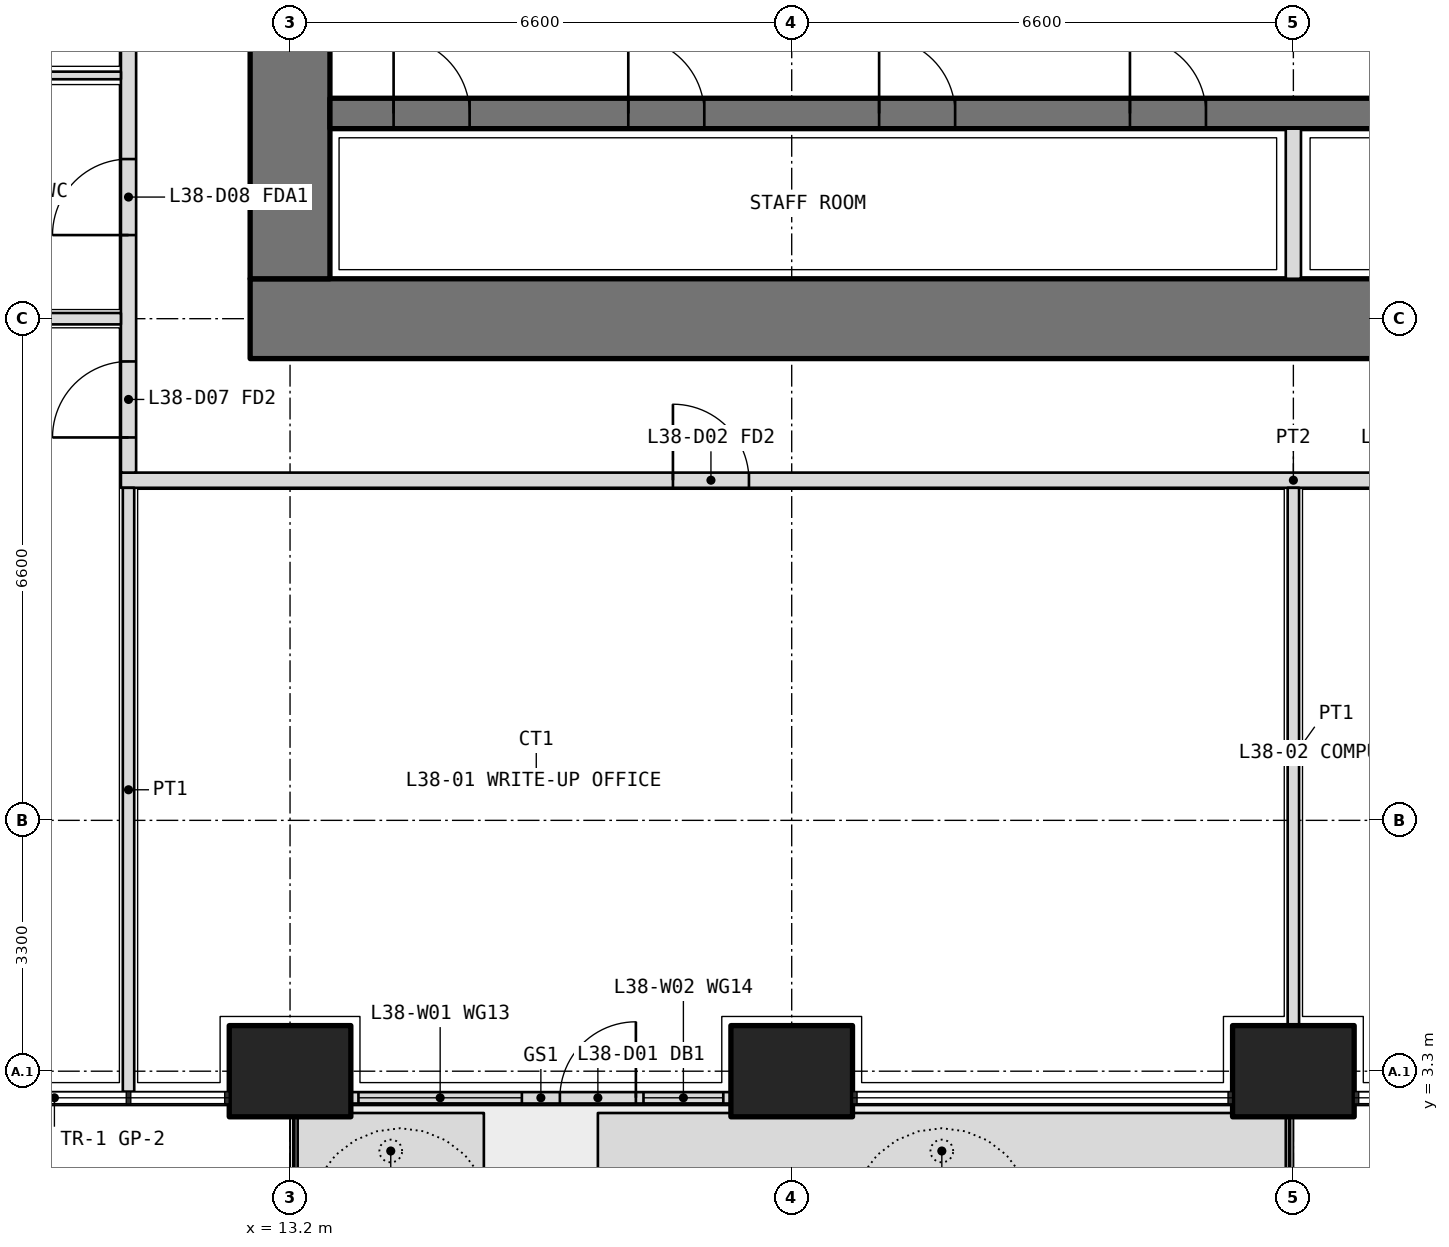
"""IFC4 building model, lengths in metres.
Left out: names, types, materials, properties, quantities, classifications, styles, units other than length and angle.
Written with IfcOpenShell. Run it as: python <this file> out.ifc"""

import sys

from ifc_helpers import new_model, si_unit, direction, frame, frame_2d, origin, origin_2d, place, context, subcontext, project, spatial, polyline, rectangle, outline, extrude, element, fill, save


model = new_model("IFC4")
c1 = context("Model", 3, precision=1e-05, world=origin(), true_north=direction((0.0, 1.0)))
c2 = subcontext(c1, "Body", "Model", "MODEL_VIEW")
j1 = project(units=[si_unit("LENGTHUNIT", "METRE"), si_unit("PLANEANGLEUNIT", "RADIAN")], contexts=[c1])
p1 = place(None, origin())
s1 = spatial("IfcSite", under=j1, at=p1, CompositionType="ELEMENT")
p2 = place(p1, origin())
s2 = spatial("IfcBuilding", under=s1, at=p2, CompositionType="ELEMENT")
p3 = place(p2, frame((0.0, 0.0, 168.3)))
s3 = spatial("IfcBuildingStorey", under=s2, at=p3, CompositionType="ELEMENT", Elevation=168.3)
for number, where, z_axis, x_axis in (
    (1, (13.2, 3.3, 0.0), (0.0, 0.0, 1.0), (1.0, 0.0, 0.0)),
    (2, (19.8, 3.3, 0.0), (0.0, 0.0, 1.0), (1.0, 0.0, 0.0)),
    (3, (26.4, 3.3, 0.0), (0.0, 0.0, 1.0), (1.0, 0.0, 0.0)),
):
    element("IfcColumn", number, at=place(p3, frame(where, z_axis=z_axis, x_axis=x_axis)), inside=s3, PredefinedType="COLUMN", context=c2, shape_type="SweptSolid", body=[
        extrude(rectangle(XDim=1.6, YDim=1.2, at=origin_2d()), origin(), (0.0, 0.0, 1.0), 4.2),
    ])
p4 = place(p3, origin())
e4 = element("IfcWall", 4, at=p4, inside=s3, PredefinedType="USERDEFINED", context=c2, shape_type="SweptSolid", body=[
    extrude(outline(polyline([(13.3, 1.75), (15.75, 1.75), (15.75, 2.75), (13.3, 2.75), (13.3, 1.75)]), holes=[polyline([(13.45, 1.9), (15.6, 1.9), (15.6, 2.6), (13.45, 2.6), (13.45, 1.9)])]), origin(), (0.0, 0.0, 1.0), 1.05),
])
p5 = place(p3, origin())
e5 = element("IfcWall", 5, at=p5, inside=s3, PredefinedType="USERDEFINED", context=c2, shape_type="SweptSolid", body=[
    extrude(outline(polyline([(17.25, 1.75), (26.3, 1.75), (26.3, 2.75), (17.25, 2.75), (17.25, 1.75)]), holes=[polyline([(17.4, 1.9), (26.15, 1.9), (26.15, 2.6), (17.4, 2.6), (17.4, 1.9)])]), origin(), (0.0, 0.0, 1.0), 1.05),
])
p6 = place(p3, frame((14.0, 2.95, 0.0), z_axis=(0.0, 0.0, 1.0), x_axis=(1.0, 0.0, 0.0)))
e6 = element("IfcWall", 6, at=p6, inside=s3, PredefinedType="SOLIDWALL", context=c2, shape_type="SweptSolid", body=[
    extrude(rectangle(XDim=5.0, YDim=0.15, at=frame_2d((2.5, 0.0))), origin(), (0.0, 0.0, 1.0), 2.7),
])
p7 = place(p6, frame((2.75, 0.0, 0.0)))
e7 = element("IfcOpeningElement", 7, at=p7, cuts=e6, PredefinedType="OPENING", context=c2, shape_type="SweptSolid", body=[
    extrude(rectangle(XDim=1.0, YDim=2.4, at=frame_2d((0.5, 1.2))), frame((0.0, 0.085, 0.0), z_axis=(0.0, -1.0, 0.0), x_axis=(1.0, 0.0, 0.0)), (0.0, 0.0, 1.0), 0.17),
])
p8 = place(p6, frame((0.1, 0.0, 0.1)))
e8 = element("IfcOpeningElement", 8, at=p8, cuts=e6, PredefinedType="OPENING", context=c2, shape_type="SweptSolid", body=[
    extrude(rectangle(XDim=2.15, YDim=2.3, at=frame_2d((1.075, 1.15))), frame((0.0, 0.085, 0.0), z_axis=(0.0, -1.0, 0.0), x_axis=(1.0, 0.0, 0.0)), (0.0, 0.0, 1.0), 0.17),
])
p9 = place(p6, frame((3.85, 0.0, 0.1)))
e9 = element("IfcOpeningElement", 9, at=p9, cuts=e6, PredefinedType="OPENING", context=c2, shape_type="SweptSolid", body=[
    extrude(rectangle(XDim=1.05, YDim=2.3, at=frame_2d((0.525, 1.15))), frame((0.0, 0.085, 0.0), z_axis=(0.0, -1.0, 0.0), x_axis=(1.0, 0.0, 0.0)), (0.0, 0.0, 1.0), 0.17),
])
p10 = place(p3, frame((12.675, 13.2, 0.0), z_axis=(0.0, 0.0, 1.0), x_axis=(1.0, 0.0, 0.0)))
e10 = element("IfcWall", 10, at=p10, inside=s3, PredefinedType="SHEAR", context=c2, shape_type="SweptSolid", body=[
    extrude(rectangle(XDim=27.45, YDim=1.05, at=frame_2d((13.725, 0.0))), origin(), (0.0, 0.0, 1.0), 4.2),
])
p11 = place(p3, frame((13.2, 32.475, 0.0), z_axis=(0.0, 0.0, 1.0), x_axis=(0.0, -1.0, 0.0)))
e11 = element("IfcWall", 11, at=p11, inside=s3, PredefinedType="SHEAR", context=c2, shape_type="SweptSolid", body=[
    extrude(rectangle(XDim=18.75, YDim=1.05, at=frame_2d((9.375, 0.0))), origin(), (0.0, 0.0, 1.0), 4.2),
])
p12 = place(p11, frame((14.125, 0.0, 0.0)))
e12 = element("IfcOpeningElement", 12, at=p12, cuts=e11, PredefinedType="OPENING", context=c2, shape_type="SweptSolid", body=[
    extrude(rectangle(XDim=1.6, YDim=2.1, at=frame_2d((0.8, 1.05))), frame((0.0, 0.535, 0.0), z_axis=(0.0, -1.0, 0.0), x_axis=(1.0, 0.0, 0.0)), (0.0, 0.0, 1.0), 1.07),
])
p13 = place(p11, frame((3.325, 0.0, 0.0)))
e13 = element("IfcOpeningElement", 13, at=p13, cuts=e11, PredefinedType="OPENING", context=c2, shape_type="SweptSolid", body=[
    extrude(rectangle(XDim=1.6, YDim=2.1, at=frame_2d((0.8, 1.05))), frame((0.0, 0.535, 0.0), z_axis=(0.0, -1.0, 0.0), x_axis=(1.0, 0.0, 0.0)), (0.0, 0.0, 1.0), 1.07),
])
p14 = place(p3, frame((13.725, 15.9, 0.0), z_axis=(0.0, 0.0, 1.0), x_axis=(1.0, 0.0, 0.0)))
e14 = element("IfcWall", 14, at=p14, inside=s3, PredefinedType="SHEAR", context=c2, shape_type="SweptSolid", body=[
    extrude(rectangle(XDim=25.35, YDim=0.4, at=frame_2d((12.675, 0.0))), origin(), (0.0, 0.0, 1.0), 4.2),
])
p15 = place(p14, frame((0.837, 0.0, 0.0)))
e15 = element("IfcOpeningElement", 15, at=p15, cuts=e14, PredefinedType="OPENING", context=c2, shape_type="SweptSolid", body=[
    extrude(rectangle(XDim=1.0, YDim=2.1, at=frame_2d((0.5, 1.05))), frame((0.0, 0.21, 0.0), z_axis=(0.0, -1.0, 0.0), x_axis=(1.0, 0.0, 0.0)), (0.0, 0.0, 1.0), 0.42),
])
p16 = place(p14, frame((3.925, 0.0, 0.0)))
e16 = element("IfcOpeningElement", 16, at=p16, cuts=e14, PredefinedType="OPENING", context=c2, shape_type="SweptSolid", body=[
    extrude(rectangle(XDim=1.0, YDim=2.1, at=frame_2d((0.5, 1.05))), frame((0.0, 0.21, 0.0), z_axis=(0.0, -1.0, 0.0), x_axis=(1.0, 0.0, 0.0)), (0.0, 0.0, 1.0), 0.42),
])
p17 = place(p14, frame((7.225, 0.0, 0.0)))
e17 = element("IfcOpeningElement", 17, at=p17, cuts=e14, PredefinedType="OPENING", context=c2, shape_type="SweptSolid", body=[
    extrude(rectangle(XDim=1.0, YDim=2.1, at=frame_2d((0.5, 1.05))), frame((0.0, 0.21, 0.0), z_axis=(0.0, -1.0, 0.0), x_axis=(1.0, 0.0, 0.0)), (0.0, 0.0, 1.0), 0.42),
])
p18 = place(p14, frame((10.525, 0.0, 0.0)))
e18 = element("IfcOpeningElement", 18, at=p18, cuts=e14, PredefinedType="OPENING", context=c2, shape_type="SweptSolid", body=[
    extrude(rectangle(XDim=1.0, YDim=2.1, at=frame_2d((0.5, 1.05))), frame((0.0, 0.21, 0.0), z_axis=(0.0, -1.0, 0.0), x_axis=(1.0, 0.0, 0.0)), (0.0, 0.0, 1.0), 0.42),
])
p19 = place(p14, frame((13.825, 0.0, 0.0)))
e19 = element("IfcOpeningElement", 19, at=p19, cuts=e14, PredefinedType="OPENING", context=c2, shape_type="SweptSolid", body=[
    extrude(rectangle(XDim=1.0, YDim=2.1, at=frame_2d((0.5, 1.05))), frame((0.0, 0.21, 0.0), z_axis=(0.0, -1.0, 0.0), x_axis=(1.0, 0.0, 0.0)), (0.0, 0.0, 1.0), 0.42),
])
p20 = place(p14, frame((17.125, 0.0, 0.0)))
e20 = element("IfcOpeningElement", 20, at=p20, cuts=e14, PredefinedType="OPENING", context=c2, shape_type="SweptSolid", body=[
    extrude(rectangle(XDim=1.0, YDim=2.1, at=frame_2d((0.5, 1.05))), frame((0.0, 0.21, 0.0), z_axis=(0.0, -1.0, 0.0), x_axis=(1.0, 0.0, 0.0)), (0.0, 0.0, 1.0), 0.42),
])
p21 = place(p14, frame((20.425, 0.0, 0.0)))
e21 = element("IfcOpeningElement", 21, at=p21, cuts=e14, PredefinedType="OPENING", context=c2, shape_type="SweptSolid", body=[
    extrude(rectangle(XDim=1.0, YDim=2.1, at=frame_2d((0.5, 1.05))), frame((0.0, 0.21, 0.0), z_axis=(0.0, -1.0, 0.0), x_axis=(1.0, 0.0, 0.0)), (0.0, 0.0, 1.0), 0.42),
])
p22 = place(p14, frame((23.512, 0.0, 0.0)))
e22 = element("IfcOpeningElement", 22, at=p22, cuts=e14, PredefinedType="OPENING", context=c2, shape_type="SweptSolid", body=[
    extrude(rectangle(XDim=1.0, YDim=2.1, at=frame_2d((0.5, 1.05))), frame((0.0, 0.21, 0.0), z_axis=(0.0, -1.0, 0.0), x_axis=(1.0, 0.0, 0.0)), (0.0, 0.0, 1.0), 0.42),
])
p23 = place(p3, frame((26.4, 13.725, 0.0), z_axis=(0.0, 0.0, 1.0), x_axis=(0.0, 1.0, 0.0)))
e23 = element("IfcWall", 23, at=p23, inside=s3, PredefinedType="PARTITIONING", context=c2, shape_type="SweptSolid", body=[
    extrude(rectangle(XDim=1.975, YDim=0.2, at=frame_2d((0.987, 0.0))), origin(), (0.0, 0.0, 1.0), 4.2),
])
p24 = place(p3, frame((10.975, 11.075, 0.0), z_axis=(0.0, 0.0, 1.0), x_axis=(1.0, 0.0, 0.0)))
e24 = element("IfcWall", 24, at=p24, inside=s3, PredefinedType="PARTITIONING", context=c2, shape_type="SweptSolid", body=[
    extrude(rectangle(XDim=30.85, YDim=0.2, at=frame_2d((15.425, 0.0))), origin(), (0.0, 0.0, 1.0), 2.85),
])
p25 = place(p24, frame((7.262, 0.0, 0.0)))
e25 = element("IfcOpeningElement", 25, at=p25, cuts=e24, PredefinedType="OPENING", context=c2, shape_type="SweptSolid", body=[
    extrude(rectangle(XDim=1.0, YDim=2.1, at=frame_2d((0.5, 1.05))), frame((0.0, 0.11, 0.0), z_axis=(0.0, -1.0, 0.0), x_axis=(1.0, 0.0, 0.0)), (0.0, 0.0, 1.0), 0.22),
])
p26 = place(p24, frame((16.475, 0.0, 0.0)))
e26 = element("IfcOpeningElement", 26, at=p26, cuts=e24, PredefinedType="OPENING", context=c2, shape_type="SweptSolid", body=[
    extrude(rectangle(XDim=1.2, YDim=2.1, at=frame_2d((0.6, 1.05))), frame((0.0, 0.11, 0.0), z_axis=(0.0, -1.0, 0.0), x_axis=(1.0, 0.0, 0.0)), (0.0, 0.0, 1.0), 0.22),
])
p27 = place(p24, frame((21.525, 0.0, 0.0)))
e27 = element("IfcOpeningElement", 27, at=p27, cuts=e24, PredefinedType="OPENING", context=c2, shape_type="SweptSolid", body=[
    extrude(rectangle(XDim=1.0, YDim=2.1, at=frame_2d((0.5, 1.05))), frame((0.0, 0.11, 0.0), z_axis=(0.0, -1.0, 0.0), x_axis=(1.0, 0.0, 0.0)), (0.0, 0.0, 1.0), 0.22),
])
p28 = place(p24, frame((26.375, 0.0, 0.0)))
e28 = element("IfcOpeningElement", 28, at=p28, cuts=e24, PredefinedType="OPENING", context=c2, shape_type="SweptSolid", body=[
    extrude(rectangle(XDim=1.2, YDim=2.1, at=frame_2d((0.6, 1.05))), frame((0.0, 0.11, 0.0), z_axis=(0.0, -1.0, 0.0), x_axis=(1.0, 0.0, 0.0)), (0.0, 0.0, 1.0), 0.22),
])
p29 = place(p24, frame((29.188, 0.0, 0.0)))
e29 = element("IfcOpeningElement", 29, at=p29, cuts=e24, PredefinedType="OPENING", context=c2, shape_type="SweptSolid", body=[
    extrude(rectangle(XDim=1.0, YDim=2.1, at=frame_2d((0.5, 1.05))), frame((0.0, 0.11, 0.0), z_axis=(0.0, -1.0, 0.0), x_axis=(1.0, 0.0, 0.0)), (0.0, 0.0, 1.0), 0.22),
])
p30 = place(p3, frame((11.075, 11.175, 0.0), z_axis=(0.0, 0.0, 1.0), x_axis=(0.0, 1.0, 0.0)))
e30 = element("IfcWall", 30, at=p30, inside=s3, PredefinedType="PARTITIONING", context=c2, shape_type="SweptSolid", body=[
    extrude(rectangle(XDim=15.225, YDim=0.2, at=frame_2d((7.612, 0.0))), origin(), (0.0, 0.0, 1.0), 2.85),
])
p31 = place(p30, frame((0.462, 0.0, 0.0)))
e31 = element("IfcOpeningElement", 31, at=p31, cuts=e30, PredefinedType="OPENING", context=c2, shape_type="SweptSolid", body=[
    extrude(rectangle(XDim=1.0, YDim=2.1, at=frame_2d((0.5, 1.05))), frame((0.0, 0.11, 0.0), z_axis=(0.0, -1.0, 0.0), x_axis=(1.0, 0.0, 0.0)), (0.0, 0.0, 1.0), 0.22),
])
p32 = place(p30, frame((3.125, 0.0, 0.0)))
e32 = element("IfcOpeningElement", 32, at=p32, cuts=e30, PredefinedType="OPENING", context=c2, shape_type="SweptSolid", body=[
    extrude(rectangle(XDim=1.0, YDim=2.1, at=frame_2d((0.5, 1.05))), frame((0.0, 0.11, 0.0), z_axis=(0.0, -1.0, 0.0), x_axis=(1.0, 0.0, 0.0)), (0.0, 0.0, 1.0), 0.22),
])
p33 = place(p30, frame((6.475, 0.0, 0.0)))
e33 = element("IfcOpeningElement", 33, at=p33, cuts=e30, PredefinedType="OPENING", context=c2, shape_type="SweptSolid", body=[
    extrude(rectangle(XDim=0.9, YDim=2.1, at=frame_2d((0.45, 1.05))), frame((0.0, 0.11, 0.0), z_axis=(0.0, -1.0, 0.0), x_axis=(1.0, 0.0, 0.0)), (0.0, 0.0, 1.0), 0.22),
])
p34 = place(p30, frame((9.675, 0.0, 0.0)))
e34 = element("IfcOpeningElement", 34, at=p34, cuts=e30, PredefinedType="OPENING", context=c2, shape_type="SweptSolid", body=[
    extrude(rectangle(XDim=0.9, YDim=2.1, at=frame_2d((0.45, 1.05))), frame((0.0, 0.11, 0.0), z_axis=(0.0, -1.0, 0.0), x_axis=(1.0, 0.0, 0.0)), (0.0, 0.0, 1.0), 0.22),
])
p35 = place(p30, frame((12.925, 0.0, 0.0)))
e35 = element("IfcOpeningElement", 35, at=p35, cuts=e30, PredefinedType="OPENING", context=c2, shape_type="SweptSolid", body=[
    extrude(rectangle(XDim=1.0, YDim=2.1, at=frame_2d((0.5, 1.05))), frame((0.0, 0.11, 0.0), z_axis=(0.0, -1.0, 0.0), x_axis=(1.0, 0.0, 0.0)), (0.0, 0.0, 1.0), 0.22),
])
p36 = place(p3, frame((11.075, 3.03, 0.0), z_axis=(0.0, 0.0, 1.0), x_axis=(0.0, 1.0, 0.0)))
e36 = element("IfcWall", 36, at=p36, inside=s3, PredefinedType="PARTITIONING", context=c2, shape_type="SweptSolid", body=[
    extrude(rectangle(XDim=7.945, YDim=0.15, at=frame_2d((3.973, 0.0))), origin(), (0.0, 0.0, 1.0), 2.7),
])
p37 = place(p3, frame((26.4, 3.9, 0.0), z_axis=(0.0, 0.0, 1.0), x_axis=(0.0, 1.0, 0.0)))
e37 = element("IfcWall", 37, at=p37, inside=s3, PredefinedType="PARTITIONING", context=c2, shape_type="SweptSolid", body=[
    extrude(rectangle(XDim=7.075, YDim=0.15, at=frame_2d((3.538, 0.0))), origin(), (0.0, 0.0, 1.0), 2.85),
])
p38 = place(p3, frame((3.03, 16.4, 0.0), z_axis=(0.0, 0.0, 1.0), x_axis=(1.0, 0.0, 0.0)))
e38 = element("IfcWall", 38, at=p38, inside=s3, PredefinedType="PARTITIONING", context=c2, shape_type="SweptSolid", body=[
    extrude(rectangle(XDim=7.945, YDim=0.1, at=frame_2d((3.973, 0.0))), origin(), (0.0, 0.0, 1.0), 2.7),
])
p39 = place(p3, frame((7.2, 13.2, 0.0), z_axis=(0.0, 0.0, 1.0), x_axis=(1.0, 0.0, 0.0)))
e39 = element("IfcWall", 39, at=p39, inside=s3, PredefinedType="PARTITIONING", context=c2, shape_type="SweptSolid", body=[
    extrude(rectangle(XDim=3.775, YDim=0.15, at=frame_2d((1.888, 0.0))), origin(), (0.0, 0.0, 1.0), 2.85),
])
p40 = place(p7, origin())
e40 = element("IfcDoor", 40, at=p40, inside=s3, OperationType="SINGLE_SWING_RIGHT", PredefinedType="DOOR", context=c2, shape_type="SweptSolid", body=[
    extrude(rectangle(XDim=1.0, YDim=2.4, at=frame_2d((0.5, 1.2))), frame((0.0, 0.025, 0.0), z_axis=(0.0, -1.0, 0.0), x_axis=(1.0, 0.0, 0.0)), (0.0, 0.0, 1.0), 0.05),
])
fill(e7, e40)
p41 = place(p8, origin())
e41 = element("IfcWindow", 41, at=p41, inside=s3, PartitioningType="SINGLE_PANEL", PredefinedType="WINDOW", context=c2, shape_type="SweptSolid", body=[
    extrude(rectangle(XDim=2.15, YDim=2.3, at=frame_2d((1.075, 1.15))), frame((0.0, 0.03, 0.0), z_axis=(0.0, -1.0, 0.0), x_axis=(1.0, 0.0, 0.0)), (0.0, 0.0, 1.0), 0.06),
])
fill(e8, e41)
p42 = place(p9, origin())
e42 = element("IfcWindow", 42, at=p42, inside=s3, PartitioningType="SINGLE_PANEL", PredefinedType="WINDOW", context=c2, shape_type="SweptSolid", body=[
    extrude(rectangle(XDim=1.05, YDim=2.3, at=frame_2d((0.525, 1.15))), frame((0.0, 0.03, 0.0), z_axis=(0.0, -1.0, 0.0), x_axis=(1.0, 0.0, 0.0)), (0.0, 0.0, 1.0), 0.06),
])
fill(e9, e42)
p43 = place(p25, origin())
e43 = element("IfcDoor", 43, at=p43, inside=s3, OperationType="SINGLE_SWING_LEFT", PredefinedType="DOOR", context=c2, shape_type="SweptSolid", body=[
    extrude(rectangle(XDim=1.0, YDim=2.1, at=frame_2d((0.5, 1.05))), frame((0.0, 0.025, 0.0), z_axis=(0.0, -1.0, 0.0), x_axis=(1.0, 0.0, 0.0)), (0.0, 0.0, 1.0), 0.05),
])
fill(e25, e43)
p44 = place(p31, origin())
e44 = element("IfcDoor", 44, at=p44, inside=s3, OperationType="SINGLE_SWING_LEFT", PredefinedType="DOOR", context=c2, shape_type="SweptSolid", body=[
    extrude(rectangle(XDim=1.0, YDim=2.1, at=frame_2d((0.5, 1.05))), frame((0.0, 0.025, 0.0), z_axis=(0.0, -1.0, 0.0), x_axis=(1.0, 0.0, 0.0)), (0.0, 0.0, 1.0), 0.05),
])
fill(e31, e44)
p45 = place(p32, origin())
e45 = element("IfcDoor", 45, at=p45, inside=s3, OperationType="SINGLE_SWING_LEFT", PredefinedType="DOOR", context=c2, shape_type="SweptSolid", body=[
    extrude(rectangle(XDim=1.0, YDim=2.1, at=frame_2d((0.5, 1.05))), frame((0.0, 0.025, 0.0), z_axis=(0.0, -1.0, 0.0), x_axis=(1.0, 0.0, 0.0)), (0.0, 0.0, 1.0), 0.05),
])
fill(e32, e45)
p46 = place(p15, origin())
e46 = element("IfcDoor", 46, at=p46, inside=s3, OperationType="SINGLE_SWING_LEFT", PredefinedType="DOOR", context=c2, shape_type="SweptSolid", body=[
    extrude(rectangle(XDim=1.0, YDim=2.1, at=frame_2d((0.5, 1.05))), frame((0.0, 0.025, 0.0), z_axis=(0.0, -1.0, 0.0), x_axis=(1.0, 0.0, 0.0)), (0.0, 0.0, 1.0), 0.05),
])
fill(e15, e46)
p47 = place(p16, origin())
e47 = element("IfcDoor", 47, at=p47, inside=s3, OperationType="SINGLE_SWING_LEFT", PredefinedType="DOOR", context=c2, shape_type="SweptSolid", body=[
    extrude(rectangle(XDim=1.0, YDim=2.1, at=frame_2d((0.5, 1.05))), frame((0.0, 0.025, 0.0), z_axis=(0.0, -1.0, 0.0), x_axis=(1.0, 0.0, 0.0)), (0.0, 0.0, 1.0), 0.05),
])
fill(e16, e47)
p48 = place(p17, origin())
e48 = element("IfcDoor", 48, at=p48, inside=s3, OperationType="SINGLE_SWING_LEFT", PredefinedType="DOOR", context=c2, shape_type="SweptSolid", body=[
    extrude(rectangle(XDim=1.0, YDim=2.1, at=frame_2d((0.5, 1.05))), frame((0.0, 0.025, 0.0), z_axis=(0.0, -1.0, 0.0), x_axis=(1.0, 0.0, 0.0)), (0.0, 0.0, 1.0), 0.05),
])
fill(e17, e48)
p49 = place(p18, origin())
e49 = element("IfcDoor", 49, at=p49, inside=s3, OperationType="SINGLE_SWING_LEFT", PredefinedType="DOOR", context=c2, shape_type="SweptSolid", body=[
    extrude(rectangle(XDim=1.0, YDim=2.1, at=frame_2d((0.5, 1.05))), frame((0.0, 0.025, 0.0), z_axis=(0.0, -1.0, 0.0), x_axis=(1.0, 0.0, 0.0)), (0.0, 0.0, 1.0), 0.05),
])
fill(e18, e49)
save(model, sys.argv[1])
